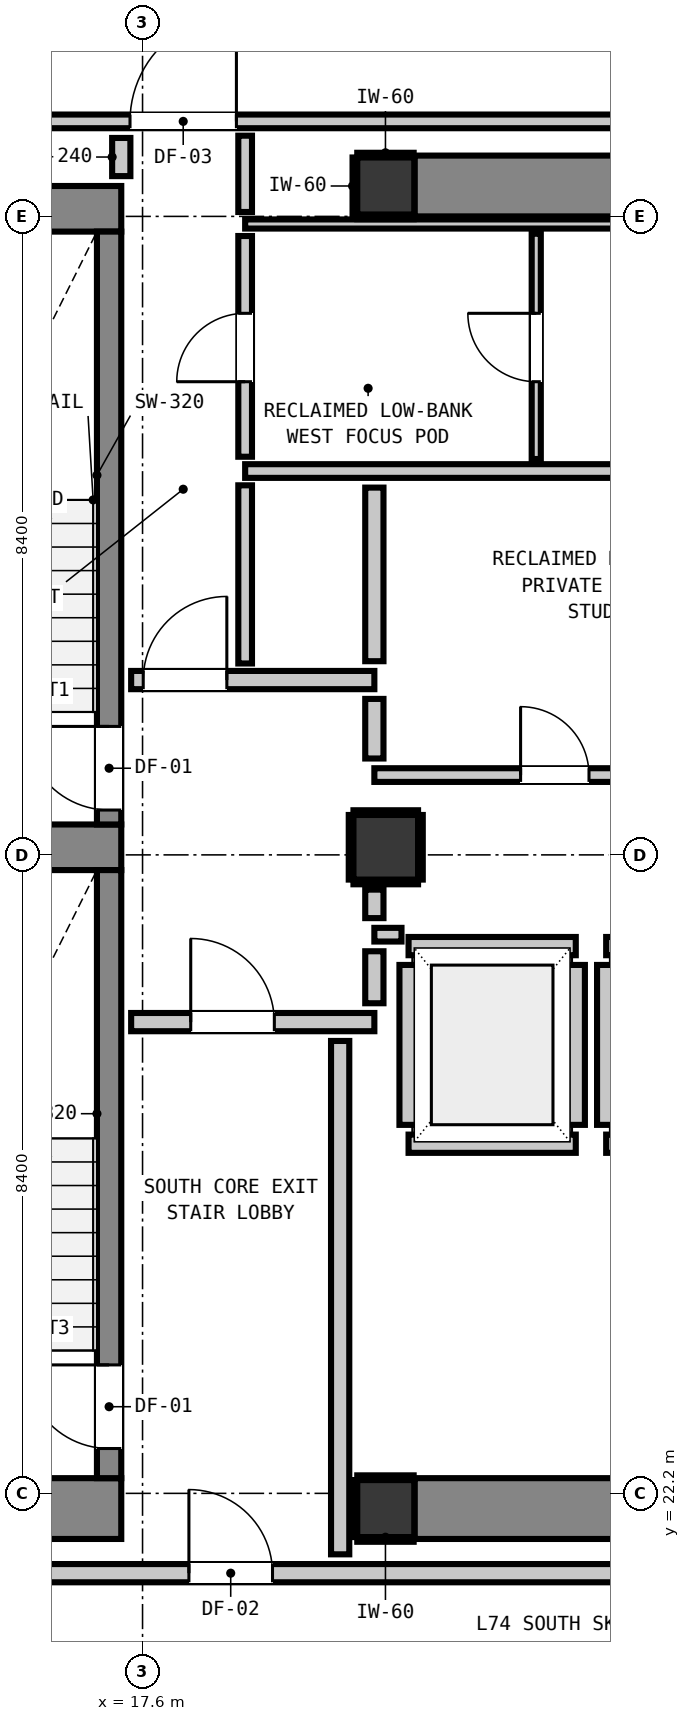
"""IFC4 building model, lengths in metres.
Left out: names, types, materials, properties, quantities, classifications, styles, units other than length and angle.
Written with IfcOpenShell. Run it as: python <this file> out.ifc"""

import sys

from ifc_helpers import new_model, si_unit, direction, frame, frame_2d, origin, origin_2d, place, context, subcontext, project, spatial, rectangle, extrude, element, fill, save


model = new_model("IFC4")
c1 = context("Model", 3, precision=1e-05, world=origin(), true_north=direction((0.0, 1.0)))
c2 = subcontext(c1, "Body", "Model", "MODEL_VIEW")
j1 = project(units=[si_unit("LENGTHUNIT", "METRE"), si_unit("PLANEANGLEUNIT", "RADIAN")], contexts=[c1])
p1 = place(None, origin())
s1 = spatial("IfcSite", under=j1, at=p1, CompositionType="ELEMENT")
p2 = place(p1, origin())
s2 = spatial("IfcBuilding", under=s1, at=p2, CompositionType="ELEMENT")
p3 = place(p2, frame((0.0, 0.0, 254.52)))
s3 = spatial("IfcBuildingStorey", under=s2, at=p3, CompositionType="ELEMENT", Elevation=254.52)
for number, where, z_axis, x_axis in (
    (1, (20.8, 22.0, 0.0), (0.0, 0.0, 1.0), (1.0, 0.0, 0.0)),
    (2, (20.8, 39.4, 0.0), (0.0, 0.0, 1.0), (1.0, 0.0, 0.0)),
):
    element("IfcColumn", number, at=place(p3, frame(where, z_axis=z_axis, x_axis=x_axis)), inside=s3, PredefinedType="COLUMN", context=c2, shape_type="SweptSolid", body=[
        extrude(rectangle(XDim=0.75, YDim=0.75, at=origin_2d()), origin(), (0.0, 0.0, 1.0), 3.32),
    ])
p4 = place(p3, frame((13.24, 22.0, 0.0), z_axis=(0.0, 0.0, 1.0), x_axis=(1.0, 0.0, 0.0)))
e3 = element("IfcWall", 3, at=p4, inside=s3, PredefinedType="SHEAR", context=c2, shape_type="SweptSolid", body=[
    extrude(rectangle(XDim=4.08, YDim=0.8, at=frame_2d((2.04, 0.0))), origin(), (0.0, 0.0, 1.0), 3.32),
])
p5 = place(p3, frame((13.24, 39.1, 0.0), z_axis=(0.0, 0.0, 1.0), x_axis=(1.0, 0.0, 0.0)))
e4 = element("IfcWall", 4, at=p5, inside=s3, PredefinedType="SHEAR", context=c2, shape_type="SweptSolid", body=[
    extrude(rectangle(XDim=4.08, YDim=0.6, at=frame_2d((2.04, 0.0))), origin(), (0.0, 0.0, 1.0), 3.32),
])
p6 = place(p3, frame((13.78, 30.7, 0.0), z_axis=(0.0, 0.0, 1.0), x_axis=(1.0, 0.0, 0.0)))
e5 = element("IfcWall", 5, at=p6, inside=s3, PredefinedType="SHEAR", context=c2, shape_type="SweptSolid", body=[
    extrude(rectangle(XDim=3.54, YDim=0.6, at=frame_2d((1.77, 0.0))), origin(), (0.0, 0.0, 1.0), 3.32),
])
for number, where, z_axis, x_axis in (
    (6, (21.18, 22.0, 0.0), (0.0, 0.0, 1.0), (1.0, 0.0, 0.0)),
    (7, (21.18, 39.4, 0.0), (0.0, 0.0, 1.0), (1.0, 0.0, 0.0)),
):
    element("IfcWall", number, at=place(p3, frame(where, z_axis=z_axis, x_axis=x_axis)), inside=s3, PredefinedType="SHEAR", context=c2, shape_type="SweptSolid", body=[
        extrude(rectangle(XDim=7.64, YDim=0.8, at=frame_2d((3.82, 0.0))), origin(), (0.0, 0.0, 1.0), 3.32),
    ])
p7 = place(p3, frame((17.16, 31.0, 0.0), z_axis=(0.0, 0.0, 1.0), x_axis=(0.0, 1.0, 0.0)))
e8 = element("IfcWall", 8, at=p7, inside=s3, PredefinedType="SHEAR", context=c2, shape_type="SweptSolid", body=[
    extrude(rectangle(XDim=7.8, YDim=0.32, at=frame_2d((3.9, 0.0))), origin(), (0.0, 0.0, 1.0), 3.32),
])
p8 = place(p7, frame((0.19, 0.0, 0.0)))
e9 = element("IfcOpeningElement", 9, at=p8, cuts=e8, PredefinedType="OPENING", context=c2, shape_type="SweptSolid", body=[
    extrude(rectangle(XDim=1.1, YDim=2.15, at=frame_2d((0.55, 1.075))), frame((0.0, 0.17, 0.0), z_axis=(0.0, -1.0, 0.0), x_axis=(1.0, 0.0, 0.0)), (0.0, 0.0, 1.0), 0.34),
])
p9 = place(p3, frame((17.16, 22.4, 0.0), z_axis=(0.0, 0.0, 1.0), x_axis=(0.0, 1.0, 0.0)))
e10 = element("IfcWall", 10, at=p9, inside=s3, PredefinedType="SHEAR", context=c2, shape_type="SweptSolid", body=[
    extrude(rectangle(XDim=8.0, YDim=0.32, at=frame_2d((4.0, 0.0))), origin(), (0.0, 0.0, 1.0), 3.32),
])
p10 = place(p9, frame((0.39, 0.0, 0.0)))
e11 = element("IfcOpeningElement", 11, at=p10, cuts=e10, PredefinedType="OPENING", context=c2, shape_type="SweptSolid", body=[
    extrude(rectangle(XDim=1.1, YDim=2.15, at=frame_2d((0.55, 1.075))), frame((0.0, 0.17, 0.0), z_axis=(0.0, -1.0, 0.0), x_axis=(1.0, 0.0, 0.0)), (0.0, 0.0, 1.0), 0.34),
])
p11 = place(p3, frame((20.8, 30.7, 0.0), z_axis=(0.0, 0.0, 1.0), x_axis=(1.0, 0.0, 0.0)))
e12 = element("IfcColumn", 12, at=p11, inside=s3, PredefinedType="COLUMN", context=c2, shape_type="SweptSolid", body=[
    extrude(rectangle(XDim=0.85, YDim=0.85, at=origin_2d()), origin(), (0.0, 0.0, 1.0), 3.32),
])
for number, where, z_axis, x_axis in (
    (13, (21.1, 26.8, 0.0), (0.0, 0.0, 1.0), (1.0, 0.0, 0.0)),
    (14, (21.1, 29.4, 0.0), (0.0, 0.0, 1.0), (1.0, 0.0, 0.0)),
):
    element("IfcWall", number, at=place(p3, frame(where, z_axis=z_axis, x_axis=x_axis)), inside=s3, PredefinedType="PARTITIONING", context=c2, shape_type="SweptSolid", body=[
        extrude(rectangle(XDim=2.2, YDim=0.24, at=frame_2d((1.1, 0.0))), origin(), (0.0, 0.0, 1.0), 2.96),
    ])
p12 = place(p3, frame((21.1, 27.048, 0.0), z_axis=(0.0, 0.0, 1.0), x_axis=(0.0, 1.0, 0.0)))
e15 = element("IfcWall", 15, at=p12, inside=s3, PredefinedType="PARTITIONING", context=c2, shape_type="SweptSolid", body=[
    extrude(rectangle(XDim=2.104, YDim=0.24, at=frame_2d((1.052, 0.0))), origin(), (0.0, 0.0, 1.0), 2.195),
])
p13 = place(p3, frame((23.3, 27.048, 0.0), z_axis=(0.0, 0.0, 1.0), x_axis=(0.0, 1.0, 0.0)))
e16 = element("IfcWall", 16, at=p13, inside=s3, PredefinedType="PARTITIONING", context=c2, shape_type="SweptSolid", body=[
    extrude(rectangle(XDim=2.104, YDim=0.24, at=frame_2d((1.052, 0.0))), origin(), (0.0, 0.0, 1.0), 2.96),
])
for number, where, z_axis, x_axis in (
    (17, (23.7, 26.8, 0.0), (0.0, 0.0, 1.0), (1.0, 0.0, 0.0)),
    (18, (23.7, 29.4, 0.0), (0.0, 0.0, 1.0), (1.0, 0.0, 0.0)),
):
    element("IfcWall", number, at=place(p3, frame(where, z_axis=z_axis, x_axis=x_axis)), inside=s3, PredefinedType="PARTITIONING", context=c2, shape_type="SweptSolid", body=[
        extrude(rectangle(XDim=2.2, YDim=0.24, at=frame_2d((1.1, 0.0))), origin(), (0.0, 0.0, 1.0), 2.96),
    ])
p14 = place(p3, frame((23.7, 27.048, 0.0), z_axis=(0.0, 0.0, 1.0), x_axis=(0.0, 1.0, 0.0)))
e19 = element("IfcWall", 19, at=p14, inside=s3, PredefinedType="PARTITIONING", context=c2, shape_type="SweptSolid", body=[
    extrude(rectangle(XDim=2.104, YDim=0.24, at=frame_2d((1.052, 0.0))), origin(), (0.0, 0.0, 1.0), 2.96),
])
p15 = place(p3, frame((13.012, 21.15, 0.0), z_axis=(0.0, 0.0, 1.0), x_axis=(1.0, 0.0, 0.0)))
e20 = element("IfcWall", 20, at=p15, inside=s3, PredefinedType="PARTITIONING", context=c2, shape_type="SweptSolid", body=[
    extrude(rectangle(XDim=28.201, YDim=0.24, at=frame_2d((14.101, 0.0))), origin(), (0.0, 0.0, 1.0), 2.96),
])
p16 = place(p15, frame((5.198, 0.0, 0.0)))
e21 = element("IfcOpeningElement", 21, at=p16, cuts=e20, PredefinedType="OPENING", context=c2, shape_type="SweptSolid", body=[
    extrude(rectangle(XDim=1.1, YDim=2.15, at=frame_2d((0.55, 1.075))), frame((0.0, 0.13, 0.0), z_axis=(0.0, -1.0, 0.0), x_axis=(1.0, 0.0, 0.0)), (0.0, 0.0, 1.0), 0.26),
])
p17 = place(p3, frame((17.45, 28.4, 0.0), z_axis=(0.0, 0.0, 1.0), x_axis=(1.0, 0.0, 0.0)))
e22 = element("IfcWall", 22, at=p17, inside=s3, PredefinedType="PARTITIONING", context=c2, shape_type="SweptSolid", body=[
    extrude(rectangle(XDim=3.2, YDim=0.24, at=frame_2d((1.6, 0.0))), origin(), (0.0, 0.0, 1.0), 2.96),
])
p18 = place(p17, frame((0.784, 0.0, 0.0)))
e23 = element("IfcOpeningElement", 23, at=p18, cuts=e22, PredefinedType="OPENING", context=c2, shape_type="SweptSolid", body=[
    extrude(rectangle(XDim=1.1, YDim=2.15, at=frame_2d((0.55, 1.075))), frame((0.0, 0.13, 0.0), z_axis=(0.0, -1.0, 0.0), x_axis=(1.0, 0.0, 0.0)), (0.0, 0.0, 1.0), 0.26),
])
p19 = place(p3, frame((17.45, 32.9, 0.0), z_axis=(0.0, 0.0, 1.0), x_axis=(1.0, 0.0, 0.0)))
e24 = element("IfcWall", 24, at=p19, inside=s3, PredefinedType="PARTITIONING", context=c2, shape_type="SweptSolid", body=[
    extrude(rectangle(XDim=3.2, YDim=0.24, at=frame_2d((1.6, 0.0))), origin(), (0.0, 0.0, 1.0), 2.96),
])
p20 = place(p19, frame((0.159, 0.0, 0.0)))
e25 = element("IfcOpeningElement", 25, at=p20, cuts=e24, PredefinedType="OPENING", context=c2, shape_type="SweptSolid", body=[
    extrude(rectangle(XDim=1.1, YDim=2.15, at=frame_2d((0.55, 1.075))), frame((0.0, 0.13, 0.0), z_axis=(0.0, -1.0, 0.0), x_axis=(1.0, 0.0, 0.0)), (0.0, 0.0, 1.0), 0.26),
])
p21 = place(p3, frame((20.65, 29.55, 0.0), z_axis=(0.0, 0.0, 1.0), x_axis=(1.0, 0.0, 0.0)))
e26 = element("IfcWall", 26, at=p21, inside=s3, PredefinedType="PARTITIONING", context=c2, shape_type="SweptSolid", body=[
    extrude(rectangle(XDim=0.357, YDim=0.18, at=frame_2d((0.179, 0.0))), origin(), (0.0, 0.0, 1.0), 2.96),
])
p22 = place(p3, frame((20.65, 31.65, 0.0), z_axis=(0.0, 0.0, 1.0), x_axis=(1.0, 0.0, 0.0)))
e27 = element("IfcWall", 27, at=p22, inside=s3, PredefinedType="PARTITIONING", context=c2, shape_type="SweptSolid", body=[
    extrude(rectangle(XDim=7.7, YDim=0.18, at=frame_2d((3.85, 0.0))), origin(), (0.0, 0.0, 1.0), 2.96),
])
p23 = place(p22, frame((1.924, 0.0, 0.0)))
e28 = element("IfcOpeningElement", 28, at=p23, cuts=e27, PredefinedType="OPENING", context=c2, shape_type="SweptSolid", body=[
    extrude(rectangle(XDim=0.9, YDim=2.1, at=frame_2d((0.45, 1.05))), frame((0.0, 0.1, 0.0), z_axis=(0.0, -1.0, 0.0), x_axis=(1.0, 0.0, 0.0)), (0.0, 0.0, 1.0), 0.2),
])
p24 = place(p3, frame((18.95, 35.65, 0.0), z_axis=(0.0, 0.0, 1.0), x_axis=(1.0, 0.0, 0.0)))
e29 = element("IfcWall", 29, at=p24, inside=s3, PredefinedType="PARTITIONING", context=c2, shape_type="SweptSolid", body=[
    extrude(rectangle(XDim=11.025, YDim=0.18, at=frame_2d((5.513, 0.0))), origin(), (0.0, 0.0, 1.0), 2.96),
])
p25 = place(p3, frame((4.587, 40.25, 0.0), z_axis=(0.0, 0.0, 1.0), x_axis=(1.0, 0.0, 0.0)))
e30 = element("IfcWall", 30, at=p25, inside=s3, PredefinedType="PARTITIONING", context=c2, shape_type="SweptSolid", body=[
    extrude(rectangle(XDim=36.626, YDim=0.18, at=frame_2d((18.313, 0.0))), origin(), (0.0, 0.0, 1.0), 2.96),
])
p26 = place(p25, frame((12.848, 0.0, 0.0)))
e31 = element("IfcOpeningElement", 31, at=p26, cuts=e30, PredefinedType="OPENING", context=c2, shape_type="SweptSolid", body=[
    extrude(rectangle(XDim=1.4, YDim=2.15, at=frame_2d((0.7, 1.075))), frame((0.0, 0.1, 0.0), z_axis=(0.0, -1.0, 0.0), x_axis=(1.0, 0.0, 0.0)), (0.0, 0.0, 1.0), 0.2),
])
p27 = place(p25, frame((4.723, 0.0, 0.0)))
e32 = element("IfcOpeningElement", 32, at=p27, cuts=e30, PredefinedType="OPENING", context=c2, shape_type="SweptSolid", body=[
    extrude(rectangle(XDim=1.0, YDim=2.15, at=frame_2d((0.5, 1.075))), frame((0.0, 0.1, 0.0), z_axis=(0.0, -1.0, 0.0), x_axis=(1.0, 0.0, 0.0)), (0.0, 0.0, 1.0), 0.2),
])
p28 = place(p3, frame((18.95, 38.9, 0.0), z_axis=(0.0, 0.0, 1.0), x_axis=(1.0, 0.0, 0.0)))
e33 = element("IfcWall", 33, at=p28, inside=s3, PredefinedType="PARTITIONING", context=c2, shape_type="SweptSolid", body=[
    extrude(rectangle(XDim=11.025, YDim=0.12, at=frame_2d((5.513, 0.0))), origin(), (0.0, 0.0, 1.0), 2.96),
])
p29 = place(p3, frame((17.32, 39.53, 0.0), z_axis=(0.0, 0.0, 1.0), x_axis=(0.0, 1.0, 0.0)))
e34 = element("IfcWall", 34, at=p29, inside=s3, PredefinedType="PARTITIONING", context=c2, shape_type="SweptSolid", body=[
    extrude(rectangle(XDim=0.502, YDim=0.24, at=frame_2d((0.251, 0.0))), origin(), (0.0, 0.0, 1.0), 2.96),
])
p30 = place(p3, frame((20.2, 21.398, 0.0), z_axis=(0.0, 0.0, 1.0), x_axis=(0.0, 1.0, 0.0)))
e35 = element("IfcWall", 35, at=p30, inside=s3, PredefinedType="PARTITIONING", context=c2, shape_type="SweptSolid", body=[
    extrude(rectangle(XDim=6.754, YDim=0.24, at=frame_2d((3.377, 0.0))), origin(), (0.0, 0.0, 1.0), 2.96),
])
p31 = place(p3, frame((20.65, 28.648, 0.0), z_axis=(0.0, 0.0, 1.0), x_axis=(0.0, 1.0, 0.0)))
e36 = element("IfcWall", 36, at=p31, inside=s3, PredefinedType="PARTITIONING", context=c2, shape_type="SweptSolid", body=[
    extrude(rectangle(XDim=0.684, YDim=0.24, at=frame_2d((0.342, 0.0))), origin(), (0.0, 0.0, 1.0), 2.195),
])
p32 = place(p3, frame((20.65, 29.768, 0.0), z_axis=(0.0, 0.0, 1.0), x_axis=(0.0, 1.0, 0.0)))
e37 = element("IfcWall", 37, at=p32, inside=s3, PredefinedType="PARTITIONING", context=c2, shape_type="SweptSolid", body=[
    extrude(rectangle(XDim=0.375, YDim=0.24, at=frame_2d((0.188, 0.0))), origin(), (0.0, 0.0, 1.0), 2.195),
])
p33 = place(p3, frame((20.65, 31.868, 0.0), z_axis=(0.0, 0.0, 1.0), x_axis=(0.0, 1.0, 0.0)))
e38 = element("IfcWall", 38, at=p33, inside=s3, PredefinedType="PARTITIONING", context=c2, shape_type="SweptSolid", body=[
    extrude(rectangle(XDim=0.784, YDim=0.24, at=frame_2d((0.392, 0.0))), origin(), (0.0, 0.0, 1.0), 2.195),
])
p34 = place(p3, frame((20.65, 33.148, 0.0), z_axis=(0.0, 0.0, 1.0), x_axis=(0.0, 1.0, 0.0)))
e39 = element("IfcWall", 39, at=p34, inside=s3, PredefinedType="PARTITIONING", context=c2, shape_type="SweptSolid", body=[
    extrude(rectangle(XDim=2.284, YDim=0.24, at=frame_2d((1.142, 0.0))), origin(), (0.0, 0.0, 1.0), 2.195),
])
p35 = place(p3, frame((18.95, 33.118, 0.0), z_axis=(0.0, 0.0, 1.0), x_axis=(0.0, 1.0, 0.0)))
e40 = element("IfcWall", 40, at=p35, inside=s3, PredefinedType="PARTITIONING", context=c2, shape_type="SweptSolid", body=[
    extrude(rectangle(XDim=2.344, YDim=0.18, at=frame_2d((1.172, 0.0))), origin(), (0.0, 0.0, 1.0), 2.96),
])
p36 = place(p3, frame((18.95, 35.838, 0.0), z_axis=(0.0, 0.0, 1.0), x_axis=(0.0, 1.0, 0.0)))
e41 = element("IfcWall", 41, at=p36, inside=s3, PredefinedType="PARTITIONING", context=c2, shape_type="SweptSolid", body=[
    extrude(rectangle(XDim=2.904, YDim=0.18, at=frame_2d((1.452, 0.0))), origin(), (0.0, 0.0, 1.0), 2.96),
])
p37 = place(p36, frame((0.987, 0.0, 0.0)))
e42 = element("IfcOpeningElement", 42, at=p37, cuts=e41, PredefinedType="OPENING", context=c2, shape_type="SweptSolid", body=[
    extrude(rectangle(XDim=0.9, YDim=2.1, at=frame_2d((0.45, 1.05))), frame((0.0, 0.1, 0.0), z_axis=(0.0, -1.0, 0.0), x_axis=(1.0, 0.0, 0.0)), (0.0, 0.0, 1.0), 0.2),
])
p38 = place(p3, frame((18.95, 39.058, 0.0), z_axis=(0.0, 0.0, 1.0), x_axis=(0.0, 1.0, 0.0)))
e43 = element("IfcWall", 43, at=p38, inside=s3, PredefinedType="PARTITIONING", context=c2, shape_type="SweptSolid", body=[
    extrude(rectangle(XDim=1.004, YDim=0.18, at=frame_2d((0.502, 0.0))), origin(), (0.0, 0.0, 1.0), 2.96),
])
p39 = place(p3, frame((22.78, 35.808, 0.0), z_axis=(0.0, 0.0, 1.0), x_axis=(0.0, 1.0, 0.0)))
e44 = element("IfcWall", 44, at=p39, inside=s3, PredefinedType="PARTITIONING", context=c2, shape_type="SweptSolid", body=[
    extrude(rectangle(XDim=2.964, YDim=0.12, at=frame_2d((1.482, 0.0))), origin(), (0.0, 0.0, 1.0), 2.96),
])
p40 = place(p39, frame((1.017, 0.0, 0.0)))
e45 = element("IfcOpeningElement", 45, at=p40, cuts=e44, PredefinedType="OPENING", context=c2, shape_type="SweptSolid", body=[
    extrude(rectangle(XDim=0.9, YDim=2.1, at=frame_2d((0.45, 1.05))), frame((0.0, 0.07, 0.0), z_axis=(0.0, -1.0, 0.0), x_axis=(1.0, 0.0, 0.0)), (0.0, 0.0, 1.0), 0.14),
])
for number, where, z_axis, x_axis in (
    (46, (20.425, 21.593, 0.0), (0.0, 0.0, 1.0), (1.0, 0.0, 0.0)),
    (47, (20.425, 22.407, 0.0), (0.0, 0.0, 1.0), (1.0, 0.0, 0.0)),
):
    element("IfcWall", number, at=place(p3, frame(where, z_axis=z_axis, x_axis=x_axis)), inside=s3, PredefinedType="PARTITIONING", context=c2, shape_type="SweptSolid", body=[
        extrude(rectangle(XDim=0.742, YDim=0.06, at=frame_2d((0.371, 0.0))), origin(), (0.0, 0.0, 1.0), 1.45),
    ])
p41 = place(p3, frame((20.393, 21.625, 0.0), z_axis=(0.0, 0.0, 1.0), x_axis=(0.0, 1.0, 0.0)))
e48 = element("IfcWall", 48, at=p41, inside=s3, PredefinedType="PARTITIONING", context=c2, shape_type="SweptSolid", body=[
    extrude(rectangle(XDim=0.75, YDim=0.06, at=frame_2d((0.375, 0.0))), origin(), (0.0, 0.0, 1.0), 1.45),
])
for number, where, z_axis, x_axis in (
    (49, (20.425, 38.993, 0.0), (0.0, 0.0, 1.0), (1.0, 0.0, 0.0)),
    (50, (20.425, 39.807, 0.0), (0.0, 0.0, 1.0), (1.0, 0.0, 0.0)),
):
    element("IfcWall", number, at=place(p3, frame(where, z_axis=z_axis, x_axis=x_axis)), inside=s3, PredefinedType="PARTITIONING", context=c2, shape_type="SweptSolid", body=[
        extrude(rectangle(XDim=0.742, YDim=0.06, at=frame_2d((0.371, 0.0))), origin(), (0.0, 0.0, 1.0), 1.45),
    ])
p42 = place(p3, frame((20.393, 39.025, 0.0), z_axis=(0.0, 0.0, 1.0), x_axis=(0.0, 1.0, 0.0)))
e51 = element("IfcWall", 51, at=p42, inside=s3, PredefinedType="PARTITIONING", context=c2, shape_type="SweptSolid", body=[
    extrude(rectangle(XDim=0.75, YDim=0.06, at=frame_2d((0.375, 0.0))), origin(), (0.0, 0.0, 1.0), 1.45),
])
for number, where, z_axis, x_axis in (
    (52, (20.375, 30.243, 0.0), (0.0, 0.0, 1.0), (1.0, 0.0, 0.0)),
    (53, (20.375, 31.157, 0.0), (0.0, 0.0, 1.0), (1.0, 0.0, 0.0)),
    (54, (20.343, 30.275, 0.0), (0.0, 0.0, 1.0), (0.0, 1.0, 0.0)),
    (55, (21.257, 30.275, 0.0), (0.0, 0.0, 1.0), (0.0, 1.0, 0.0)),
):
    element("IfcWall", number, at=place(p3, frame(where, z_axis=z_axis, x_axis=x_axis)), inside=s3, PredefinedType="PARTITIONING", context=c2, shape_type="SweptSolid", body=[
        extrude(rectangle(XDim=0.85, YDim=0.06, at=frame_2d((0.425, 0.0))), origin(), (0.0, 0.0, 1.0), 1.45),
    ])
p43 = place(p8, origin())
e56 = element("IfcDoor", 56, at=p43, inside=s3, OperationType="SINGLE_SWING_RIGHT", PredefinedType="DOOR", context=c2, shape_type="SweptSolid", body=[
    extrude(rectangle(XDim=1.1, YDim=2.15, at=frame_2d((0.55, 1.075))), frame((0.0, 0.025, 0.0), z_axis=(0.0, -1.0, 0.0), x_axis=(1.0, 0.0, 0.0)), (0.0, 0.0, 1.0), 0.05),
])
fill(e9, e56)
p44 = place(p10, origin())
e57 = element("IfcDoor", 57, at=p44, inside=s3, OperationType="SINGLE_SWING_RIGHT", PredefinedType="DOOR", context=c2, shape_type="SweptSolid", body=[
    extrude(rectangle(XDim=1.1, YDim=2.15, at=frame_2d((0.55, 1.075))), frame((0.0, 0.025, 0.0), z_axis=(0.0, -1.0, 0.0), x_axis=(1.0, 0.0, 0.0)), (0.0, 0.0, 1.0), 0.05),
])
fill(e11, e57)
p45 = place(p18, origin())
e58 = element("IfcDoor", 58, at=p45, inside=s3, OperationType="SINGLE_SWING_LEFT", PredefinedType="DOOR", context=c2, shape_type="SweptSolid", body=[
    extrude(rectangle(XDim=1.1, YDim=2.15, at=frame_2d((0.55, 1.075))), frame((0.0, 0.025, 0.0), z_axis=(0.0, -1.0, 0.0), x_axis=(1.0, 0.0, 0.0)), (0.0, 0.0, 1.0), 0.05),
])
fill(e23, e58)
p46 = place(p20, origin())
e59 = element("IfcDoor", 59, at=p46, inside=s3, OperationType="SINGLE_SWING_RIGHT", PredefinedType="DOOR", context=c2, shape_type="SweptSolid", body=[
    extrude(rectangle(XDim=1.1, YDim=2.15, at=frame_2d((0.55, 1.075))), frame((0.0, 0.025, 0.0), z_axis=(0.0, -1.0, 0.0), x_axis=(1.0, 0.0, 0.0)), (0.0, 0.0, 1.0), 0.05),
])
fill(e25, e59)
p47 = place(p16, origin())
e60 = element("IfcDoor", 60, at=p47, inside=s3, OperationType="SINGLE_SWING_LEFT", PredefinedType="DOOR", context=c2, shape_type="SweptSolid", body=[
    extrude(rectangle(XDim=1.1, YDim=2.15, at=frame_2d((0.55, 1.075))), frame((0.0, 0.025, 0.0), z_axis=(0.0, -1.0, 0.0), x_axis=(1.0, 0.0, 0.0)), (0.0, 0.0, 1.0), 0.05),
])
fill(e21, e60)
p48 = place(p26, origin())
e61 = element("IfcDoor", 61, at=p48, inside=s3, OperationType="SINGLE_SWING_RIGHT", PredefinedType="DOOR", context=c2, shape_type="SweptSolid", body=[
    extrude(rectangle(XDim=1.4, YDim=2.15, at=frame_2d((0.7, 1.075))), frame((0.0, 0.025, 0.0), z_axis=(0.0, -1.0, 0.0), x_axis=(1.0, 0.0, 0.0)), (0.0, 0.0, 1.0), 0.05),
])
fill(e31, e61)
p49 = place(p37, origin())
e62 = element("IfcDoor", 62, at=p49, inside=s3, OperationType="SINGLE_SWING_LEFT", PredefinedType="DOOR", context=c2, shape_type="SweptSolid", body=[
    extrude(rectangle(XDim=0.9, YDim=2.1, at=frame_2d((0.45, 1.05))), frame((0.0, 0.025, 0.0), z_axis=(0.0, -1.0, 0.0), x_axis=(1.0, 0.0, 0.0)), (0.0, 0.0, 1.0), 0.05),
])
fill(e42, e62)
p50 = place(p40, origin())
e63 = element("IfcDoor", 63, at=p50, inside=s3, OperationType="SINGLE_SWING_RIGHT", PredefinedType="DOOR", context=c2, shape_type="SweptSolid", body=[
    extrude(rectangle(XDim=0.9, YDim=2.1, at=frame_2d((0.45, 1.05))), frame((0.0, 0.025, 0.0), z_axis=(0.0, -1.0, 0.0), x_axis=(1.0, 0.0, 0.0)), (0.0, 0.0, 1.0), 0.05),
])
fill(e45, e63)
p51 = place(p23, origin())
e64 = element("IfcDoor", 64, at=p51, inside=s3, OperationType="SINGLE_SWING_LEFT", PredefinedType="DOOR", context=c2, shape_type="SweptSolid", body=[
    extrude(rectangle(XDim=0.9, YDim=2.1, at=frame_2d((0.45, 1.05))), frame((0.0, 0.025, 0.0), z_axis=(0.0, -1.0, 0.0), x_axis=(1.0, 0.0, 0.0)), (0.0, 0.0, 1.0), 0.05),
])
fill(e28, e64)
save(model, sys.argv[1])
